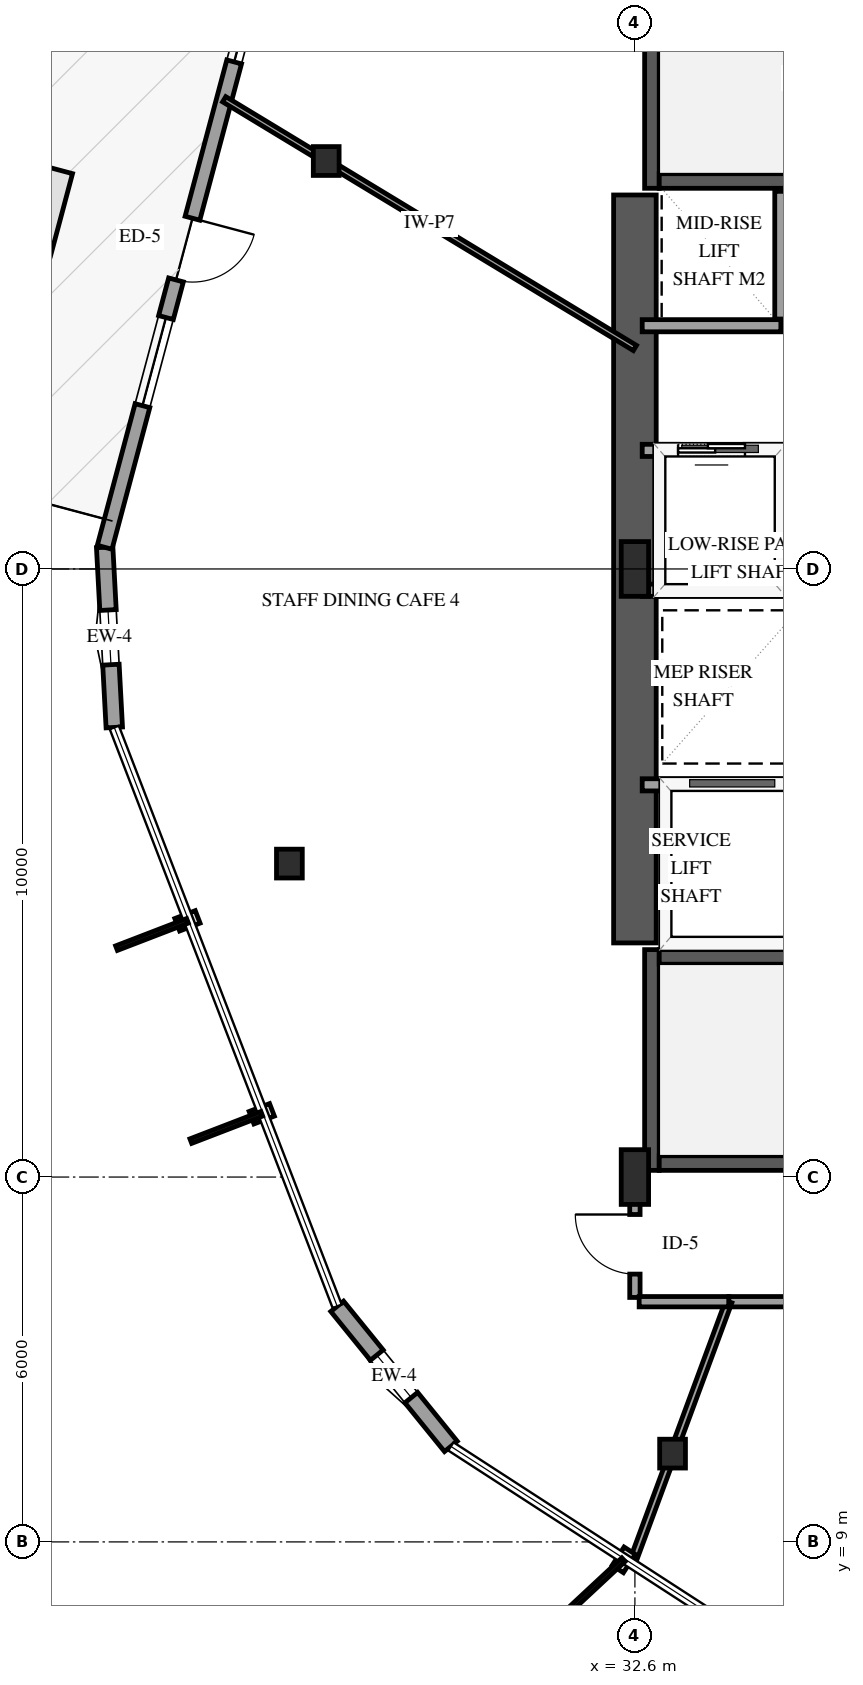
"""IFC4 building model, lengths in metres.
Left out: names, types, materials, properties, quantities, classifications, styles, units other than length and angle.
Written with IfcOpenShell. Run it as: python <this file> out.ifc"""

import sys

from ifc_helpers import new_model, si_unit, direction, frame, frame_2d, origin, origin_2d, place, context, subcontext, project, spatial, rectangle, i_section, extrude, element, fill, save


model = new_model("IFC4")
c1 = context("Model", 3, precision=1e-05, world=origin(), true_north=direction((0.0, 1.0)))
c2 = subcontext(c1, "Body", "Model", "MODEL_VIEW")
j1 = project(units=[si_unit("LENGTHUNIT", "METRE"), si_unit("PLANEANGLEUNIT", "RADIAN")], contexts=[c1])
p1 = place(None, origin())
s1 = spatial("IfcSite", under=j1, at=p1, CompositionType="ELEMENT")
p2 = place(p1, origin())
s2 = spatial("IfcBuilding", under=s1, at=p2, CompositionType="ELEMENT")
p3 = place(p2, frame((0.0, 0.0, 38.6)))
s3 = spatial("IfcBuildingStorey", under=s2, at=p3, CompositionType="ELEMENT", Elevation=38.6)
p4 = place(p3, frame((32.88, 15.11, 0.0), z_axis=(0.0, 0.0, 1.0), x_axis=(0.0, 1.0, 0.0)))
e1 = element("IfcWall", 1, at=p4, inside=s3, PredefinedType="SHEAR", context=c2, shape_type="SweptSolid", body=[
    extrude(rectangle(XDim=3.63, YDim=0.24, at=frame_2d((1.815, 0.0))), origin(), (0.0, 0.0, 1.0), 4.0),
])
for number, where, z_axis, x_axis in (
    (2, (33.0, 15.23, 0.0), (0.0, 0.0, 1.0), (1.0, 0.0, 0.0)),
    (3, (33.0, 18.62, 0.0), (0.0, 0.0, 1.0), (1.0, 0.0, 0.0)),
):
    element("IfcWall", number, at=place(p3, frame(where, z_axis=z_axis, x_axis=x_axis)), inside=s3, PredefinedType="SHEAR", context=c2, shape_type="SweptSolid", body=[
        extrude(rectangle(XDim=8.0, YDim=0.24, at=frame_2d((4.0, 0.0))), origin(), (0.0, 0.0, 1.0), 4.0),
    ])
p5 = place(p3, frame((32.88, 31.26, 0.0), z_axis=(0.0, 0.0, 1.0), x_axis=(0.0, 1.0, 0.0)))
e4 = element("IfcWall", 4, at=p5, inside=s3, PredefinedType="SHEAR", context=c2, shape_type="SweptSolid", body=[
    extrude(rectangle(XDim=3.63, YDim=0.24, at=frame_2d((1.815, 0.0))), origin(), (0.0, 0.0, 1.0), 4.0),
])
p6 = place(p3, frame((33.0, 31.38, 0.0), z_axis=(0.0, 0.0, 1.0), x_axis=(1.0, 0.0, 0.0)))
e5 = element("IfcWall", 5, at=p6, inside=s3, PredefinedType="SHEAR", context=c2, shape_type="SweptSolid", body=[
    extrude(rectangle(XDim=8.0, YDim=0.24, at=frame_2d((4.0, 0.0))), origin(), (0.0, 0.0, 1.0), 4.0),
])
p7 = place(p3, frame((32.6, 18.85, 0.0), z_axis=(0.0, 0.0, 1.0), x_axis=(0.0, 1.0, 0.0)))
e6 = element("IfcWall", 6, at=p7, inside=s3, PredefinedType="SHEAR", context=c2, shape_type="SweptSolid", body=[
    extrude(rectangle(XDim=12.3, YDim=0.7, at=frame_2d((6.15, 0.0))), origin(), (0.0, 0.0, 1.0), 4.0),
])
for number, where, z_axis, x_axis in (
    (7, (32.6, 15.0, 0.0), (0.0, 0.0, 1.0), (1.0, 0.0, 0.0)),
    (8, (32.6, 25.0, 0.0), (0.0, 0.0, 1.0), (1.0, 0.0, 0.0)),
):
    element("IfcColumn", number, at=place(p3, frame(where, z_axis=z_axis, x_axis=x_axis)), inside=s3, PredefinedType="PILASTER", context=c2, shape_type="SweptSolid", body=[
        extrude(rectangle(XDim=0.45, YDim=0.9, at=origin_2d()), origin(), (0.0, 0.0, 1.0), 4.0),
    ])
for number, where, z_axis, x_axis in (
    (9, (27.523, 31.708, 0.0), (0.0, 0.0, 1.0), (1.0, 0.0, 0.0)),
    (10, (26.918, 20.155, 0.0), (0.0, 0.0, 1.0), (1.0, 0.0, 0.0)),
    (11, (33.219, 10.452, 0.0), (0.0, 0.0, 1.0), (1.0, 0.0, 0.0)),
):
    element("IfcColumn", number, at=place(p3, frame(where, z_axis=z_axis, x_axis=x_axis)), inside=s3, PredefinedType="COLUMN", context=c2, shape_type="SweptSolid", body=[
        extrude(i_section(OverallWidth=0.424, OverallDepth=0.474, WebThickness=0.048, FlangeThickness=0.077, FilletRadius=0.038, at=origin_2d()), origin(), (0.0, 0.0, 1.0), 4.0),
    ])
p8 = place(p3, frame((23.88, 25.356, 0.0), z_axis=(0.0, 0.0, 1.0), x_axis=(0.053409730545, -0.998572681723, 0.0)))
e12 = element("IfcWall", 12, at=p8, inside=s3, PredefinedType="SOLIDWALL", context=c2, shape_type="SweptSolid", body=[
    extrude(rectangle(XDim=2.967, YDim=0.27, at=frame_2d((1.483, 0.0))), origin(), (0.0, 0.0, 1.0), 3.079),
])
p9 = place(p8, frame((1.033, 0.0, 0.75)))
e13 = element("IfcOpeningElement", 13, at=p9, cuts=e12, PredefinedType="OPENING", context=c2, shape_type="SweptSolid", body=[
    extrude(rectangle(XDim=0.9, YDim=1.5, at=frame_2d((0.45, 0.75))), frame((0.0, 0.145, 0.0), z_axis=(0.0, -1.0, 0.0), x_axis=(1.0, 0.0, 0.0)), (0.0, 0.0, 1.0), 0.29),
])
p10 = place(p3, frame((26.51, 35.213, 0.0), z_axis=(0.0, 0.0, 1.0), x_axis=(-0.257827991611, -0.966190833501, 0.0)))
e14 = element("IfcWall", 14, at=p10, inside=s3, PredefinedType="SOLIDWALL", context=c2, shape_type="SweptSolid", body=[
    extrude(rectangle(XDim=10.201, YDim=0.25, at=frame_2d((5.101, 0.0))), origin(), (0.0, 0.0, 1.0), 3.079),
])
p11 = place(p10, frame((4.601, 0.0, 0.0)))
e15 = element("IfcOpeningElement", 15, at=p11, cuts=e14, PredefinedType="OPENING", context=c2, shape_type="SweptSolid", body=[
    extrude(rectangle(XDim=1.05, YDim=2.15, at=frame_2d((0.525, 1.075))), frame((0.0, 0.135, 0.0), z_axis=(0.0, -1.0, 0.0), x_axis=(1.0, 0.0, 0.0)), (0.0, 0.0, 1.0), 0.27),
])
p12 = place(p10, frame((0.44, 0.0, 0.72)))
e16 = element("IfcOpeningElement", 16, at=p12, cuts=e14, PredefinedType="OPENING", context=c2, shape_type="SweptSolid", body=[
    extrude(rectangle(XDim=1.5, YDim=1.7, at=frame_2d((0.75, 0.85))), frame((0.0, 0.135, 0.0), z_axis=(0.0, -1.0, 0.0), x_axis=(1.0, 0.0, 0.0)), (0.0, 0.0, 1.0), 0.27),
])
p13 = place(p10, frame((6.291, 0.0, 0.72)))
e17 = element("IfcOpeningElement", 17, at=p13, cuts=e14, PredefinedType="OPENING", context=c2, shape_type="SweptSolid", body=[
    extrude(rectangle(XDim=1.5, YDim=1.7, at=frame_2d((0.75, 0.85))), frame((0.0, 0.135, 0.0), z_axis=(0.0, -1.0, 0.0), x_axis=(1.0, 0.0, 0.0)), (0.0, 0.0, 1.0), 0.27),
])
p14 = place(p3, frame((27.704, 12.874, 0.0), z_axis=(0.0, 0.0, 1.0), x_axis=(0.630149473082, -0.776473851185, 0.0)))
e18 = element("IfcWall", 18, at=p14, inside=s3, PredefinedType="SOLIDWALL", context=c2, shape_type="SweptSolid", body=[
    extrude(rectangle(XDim=2.967, YDim=0.27, at=frame_2d((1.483, 0.0))), origin(), (0.0, 0.0, 1.0), 3.079),
])
p15 = place(p14, frame((1.033, 0.0, 0.75)))
e19 = element("IfcOpeningElement", 19, at=p15, cuts=e18, PredefinedType="OPENING", context=c2, shape_type="SweptSolid", body=[
    extrude(rectangle(XDim=0.9, YDim=1.5, at=frame_2d((0.45, 0.75))), frame((0.0, 0.145, 0.0), z_axis=(0.0, -1.0, 0.0), x_axis=(1.0, 0.0, 0.0)), (0.0, 0.0, 1.0), 0.29),
])
p16 = place(p3, frame((32.72, 21.45, 0.0), z_axis=(0.0, 0.0, 1.0), x_axis=(1.0, 0.0, 0.0)))
e20 = element("IfcWall", 20, at=p16, inside=s3, PredefinedType="SOLIDWALL", context=c2, shape_type="SweptSolid", body=[
    extrude(rectangle(XDim=2.58, YDim=0.2, at=frame_2d((1.29, 0.0))), origin(), (0.0, 0.0, 1.0), 3.7),
])
p17 = place(p3, frame((32.72, 24.65, 0.0), z_axis=(0.0, 0.0, 1.0), x_axis=(1.0, 0.0, 0.0)))
e21 = element("IfcWall", 21, at=p17, inside=s3, PredefinedType="SOLIDWALL", context=c2, shape_type="SweptSolid", body=[
    extrude(rectangle(XDim=2.28, YDim=0.2, at=frame_2d((1.14, 0.0))), origin(), (0.0, 0.0, 1.0), 3.7),
])
p18 = place(p3, frame((32.72, 26.95, 0.0), z_axis=(0.0, 0.0, 1.0), x_axis=(1.0, 0.0, 0.0)))
e22 = element("IfcWall", 22, at=p18, inside=s3, PredefinedType="SOLIDWALL", context=c2, shape_type="SweptSolid", body=[
    extrude(rectangle(XDim=2.28, YDim=0.2, at=frame_2d((1.14, 0.0))), origin(), (0.0, 0.0, 1.0), 3.7),
])
p19 = place(p18, frame((0.59, 0.0, 0.0)))
e23 = element("IfcOpeningElement", 23, at=p19, cuts=e22, PredefinedType="OPENING", context=c2, shape_type="SweptSolid", body=[
    extrude(rectangle(XDim=1.1, YDim=2.15, at=frame_2d((0.55, 1.075))), frame((0.0, 0.11, 0.0), z_axis=(0.0, -1.0, 0.0), x_axis=(1.0, 0.0, 0.0)), (0.0, 0.0, 1.0), 0.22),
])
p20 = place(p3, frame((35.0, 24.76, 0.0), z_axis=(0.0, 0.0, 1.0), x_axis=(0.0, 1.0, 0.0)))
e24 = element("IfcWall", 24, at=p20, inside=s3, PredefinedType="SOLIDWALL", context=c2, shape_type="SweptSolid", body=[
    extrude(rectangle(XDim=2.08, YDim=0.2, at=frame_2d((1.04, 0.0))), origin(), (0.0, 0.0, 1.0), 3.7),
])
p21 = place(p3, frame((32.72, 29.0, 0.0), z_axis=(0.0, 0.0, 1.0), x_axis=(1.0, 0.0, 0.0)))
e25 = element("IfcWall", 25, at=p21, inside=s3, PredefinedType="SOLIDWALL", context=c2, shape_type="SweptSolid", body=[
    extrude(rectangle(XDim=2.28, YDim=0.2, at=frame_2d((1.14, 0.0))), origin(), (0.0, 0.0, 1.0), 3.7),
])
p22 = place(p3, frame((35.0, 29.11, 0.0), z_axis=(0.0, 0.0, 1.0), x_axis=(0.0, 1.0, 0.0)))
e26 = element("IfcWall", 26, at=p22, inside=s3, PredefinedType="SOLIDWALL", context=c2, shape_type="SweptSolid", body=[
    extrude(rectangle(XDim=2.1, YDim=0.2, at=frame_2d((1.05, 0.0))), origin(), (0.0, 0.0, 1.0), 3.7),
])
p23 = place(p3, frame((42.094, 12.95, 0.0), z_axis=(0.0, 0.0, 1.0), x_axis=(-1.0, 0.0, 0.0)))
e27 = element("IfcWall", 27, at=p23, inside=s3, PredefinedType="PARTITIONING", context=c2, shape_type="SweptSolid", body=[
    extrude(rectangle(XDim=7.951, YDim=0.17, at=frame_2d((3.976, 0.0))), origin(), (0.0, 0.0, 1.0), 3.7),
])
p24 = place(p23, frame((3.501, 0.0, 0.0)))
e28 = element("IfcOpeningElement", 28, at=p24, cuts=e27, PredefinedType="OPENING", context=c2, shape_type="SweptSolid", body=[
    extrude(rectangle(XDim=0.98, YDim=2.15, at=frame_2d((0.49, 1.075))), frame((0.0, 0.095, 0.0), z_axis=(0.0, -1.0, 0.0), x_axis=(1.0, 0.0, 0.0)), (0.0, 0.0, 1.0), 0.19),
])
p25 = place(p3, frame((32.6, 28.634, 0.0), z_axis=(0.0, 0.0, 1.0), x_axis=(-0.855385077894, 0.517992633651, 0.0)))
e29 = element("IfcWall", 29, at=p25, inside=s3, PredefinedType="PARTITIONING", context=c2, shape_type="SweptSolid", body=[
    extrude(rectangle(XDim=7.896, YDim=0.1, at=frame_2d((3.948, 0.0))), origin(), (0.0, 0.0, 1.0), 3.7),
])
p26 = place(p3, frame((34.143, 12.95, 0.0), z_axis=(0.0, 0.0, 1.0), x_axis=(-0.346838221827, -0.937924969217, 0.0)))
e30 = element("IfcWall", 30, at=p26, inside=s3, PredefinedType="PARTITIONING", context=c2, shape_type="SweptSolid", body=[
    extrude(rectangle(XDim=4.593, YDim=0.11, at=frame_2d((2.296, 0.0))), origin(), (0.0, 0.0, 1.0), 2.995),
])
p27 = place(p3, frame((32.6, 13.02, 0.0), z_axis=(0.0, 0.0, 1.0), x_axis=(0.0, 1.0, 0.0)))
e31 = element("IfcWall", 31, at=p27, inside=s3, PredefinedType="PARTITIONING", context=c2, shape_type="SweptSolid", body=[
    extrude(rectangle(XDim=1.91, YDim=0.17, at=frame_2d((0.955, 0.0))), origin(), (0.0, 0.0, 1.0), 3.7),
])
p28 = place(p27, frame((0.384, 0.0, 0.0)))
e32 = element("IfcOpeningElement", 32, at=p28, cuts=e31, PredefinedType="OPENING", context=c2, shape_type="SweptSolid", body=[
    extrude(rectangle(XDim=0.98, YDim=2.15, at=frame_2d((0.49, 1.075))), frame((0.0, 0.095, 0.0), z_axis=(0.0, -1.0, 0.0), x_axis=(1.0, 0.0, 0.0)), (0.0, 0.0, 1.0), 0.19),
])
p29 = place(p3, frame((34.143, 12.95, 0.0), z_axis=(0.0, 0.0, 1.0), x_axis=(-1.0, 0.0, 0.0)))
e33 = element("IfcWall", 33, at=p29, inside=s3, PredefinedType="PARTITIONING", context=c2, shape_type="SweptSolid", body=[
    extrude(rectangle(XDim=1.473, YDim=0.17, at=frame_2d((0.737, 0.0))), origin(), (0.0, 0.0, 1.0), 3.7),
])
p30 = place(p9, origin())
e34 = element("IfcWindow", 34, at=p30, inside=s3, PartitioningType="SINGLE_PANEL", PredefinedType="WINDOW", context=c2, shape_type="SweptSolid", body=[
    extrude(rectangle(XDim=0.9, YDim=1.5, at=frame_2d((0.45, 0.75))), frame((0.0, 0.03, 0.0), z_axis=(0.0, -1.0, 0.0), x_axis=(1.0, 0.0, 0.0)), (0.0, 0.0, 1.0), 0.06),
])
fill(e13, e34)
p31 = place(p11, origin())
e35 = element("IfcDoor", 35, at=p31, inside=s3, OperationType="SINGLE_SWING_LEFT", PredefinedType="DOOR", context=c2, shape_type="SweptSolid", body=[
    extrude(rectangle(XDim=1.05, YDim=2.15, at=frame_2d((0.525, 1.075))), frame((0.0, 0.025, 0.0), z_axis=(0.0, -1.0, 0.0), x_axis=(1.0, 0.0, 0.0)), (0.0, 0.0, 1.0), 0.05),
])
fill(e15, e35)
p32 = place(p12, origin())
e36 = element("IfcWindow", 36, at=p32, inside=s3, PartitioningType="SINGLE_PANEL", PredefinedType="WINDOW", context=c2, shape_type="SweptSolid", body=[
    extrude(rectangle(XDim=1.5, YDim=1.7, at=frame_2d((0.75, 0.85))), frame((0.0, 0.03, 0.0), z_axis=(0.0, -1.0, 0.0), x_axis=(1.0, 0.0, 0.0)), (0.0, 0.0, 1.0), 0.06),
])
fill(e16, e36)
p33 = place(p13, origin())
e37 = element("IfcWindow", 37, at=p33, inside=s3, PartitioningType="SINGLE_PANEL", PredefinedType="WINDOW", context=c2, shape_type="SweptSolid", body=[
    extrude(rectangle(XDim=1.5, YDim=1.7, at=frame_2d((0.75, 0.85))), frame((0.0, 0.03, 0.0), z_axis=(0.0, -1.0, 0.0), x_axis=(1.0, 0.0, 0.0)), (0.0, 0.0, 1.0), 0.06),
])
fill(e17, e37)
p34 = place(p15, origin())
e38 = element("IfcWindow", 38, at=p34, inside=s3, PartitioningType="SINGLE_PANEL", PredefinedType="WINDOW", context=c2, shape_type="SweptSolid", body=[
    extrude(rectangle(XDim=0.9, YDim=1.5, at=frame_2d((0.45, 0.75))), frame((0.0, 0.03, 0.0), z_axis=(0.0, -1.0, 0.0), x_axis=(1.0, 0.0, 0.0)), (0.0, 0.0, 1.0), 0.06),
])
fill(e19, e38)
p35 = place(p19, origin())
e39 = element("IfcDoor", 39, at=p35, inside=s3, OperationType="SLIDING_TO_LEFT", PredefinedType="DOOR", context=c2, shape_type="SweptSolid", body=[
    extrude(rectangle(XDim=1.1, YDim=2.15, at=frame_2d((0.55, 1.075))), frame((0.0, 0.025, 0.0), z_axis=(0.0, -1.0, 0.0), x_axis=(1.0, 0.0, 0.0)), (0.0, 0.0, 1.0), 0.05),
])
fill(e23, e39)
p36 = place(p28, origin())
e40 = element("IfcDoor", 40, at=p36, inside=s3, OperationType="SINGLE_SWING_RIGHT", PredefinedType="DOOR", context=c2, shape_type="SweptSolid", body=[
    extrude(rectangle(XDim=0.98, YDim=2.15, at=frame_2d((0.49, 1.075))), frame((0.0, 0.025, 0.0), z_axis=(0.0, -1.0, 0.0), x_axis=(1.0, 0.0, 0.0)), (0.0, 0.0, 1.0), 0.05),
])
fill(e32, e40)
save(model, sys.argv[1])
